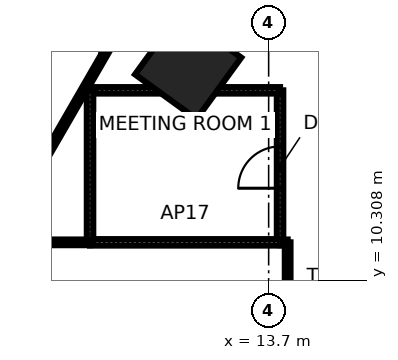
"""IFC4 building model, lengths in metres.
Left out: names, types, materials, properties, quantities, classifications, styles, units other than length and angle.
Written with IfcOpenShell. Run it as: python <this file> out.ifc"""

import sys

from ifc_helpers import new_model, si_unit, direction, frame, frame_2d, origin, origin_2d, place, context, subcontext, project, spatial, rectangle, extrude, element, fill, save


model = new_model("IFC4")
c1 = context("Model", 3, precision=1e-05, world=origin(), true_north=direction((0.0, 1.0)))
c2 = subcontext(c1, "Body", "Model", "MODEL_VIEW")
j1 = project(units=[si_unit("LENGTHUNIT", "METRE"), si_unit("PLANEANGLEUNIT", "RADIAN")], contexts=[c1])
p1 = place(None, origin())
s1 = spatial("IfcSite", under=j1, at=p1, CompositionType="ELEMENT")
p2 = place(p1, origin())
s2 = spatial("IfcBuilding", under=s1, at=p2, CompositionType="ELEMENT")
p3 = place(p2, frame((0.0, 0.0, 82.6)))
s3 = spatial("IfcBuildingStorey", under=s2, at=p3, CompositionType="ELEMENT", Elevation=82.6)
p4 = place(p3, frame((11.581, 15.94, 0.0), z_axis=(0.0, 0.0, 1.0), x_axis=(0.587785252292, 0.809016994375, 0.0)))
e1 = element("IfcColumn", 1, at=p4, inside=s3, PredefinedType="COLUMN", context=c2, shape_type="SweptSolid", body=[
    extrude(rectangle(XDim=2.0, YDim=2.0, at=origin_2d()), origin(), (0.0, 0.0, 1.0), 4.2),
])
p5 = place(p3, frame((14.2, 9.5, 0.0), z_axis=(0.0, 0.0, 1.0), x_axis=(0.0, 1.0, 0.0)))
e2 = element("IfcWall", 2, at=p5, inside=s3, PredefinedType="PARTITIONING", context=c2, shape_type="SweptSolid", body=[
    extrude(rectangle(XDim=1.8, YDim=0.15, at=frame_2d((0.9, 0.0))), origin(), (0.0, 0.0, 1.0), 4.0),
])
p6 = place(p3, frame((14.2, 11.3, 0.0), z_axis=(0.0, 0.0, 1.0), x_axis=(-1.0, 0.0, 0.0)))
e3 = element("IfcWall", 3, at=p6, inside=s3, PredefinedType="PARTITIONING", context=c2, shape_type="SweptSolid", body=[
    extrude(rectangle(XDim=0.2, YDim=0.15, at=frame_2d((0.1, 0.0))), origin(), (0.0, 0.0, 1.0), 4.0),
])
p7 = place(p3, frame((14.0, 11.3, 0.0), z_axis=(0.0, 0.0, 1.0), x_axis=(0.0, 1.0, 0.0)))
e4 = element("IfcWall", 4, at=p7, inside=s3, PredefinedType="PARTITIONING", context=c2, shape_type="SweptSolid", body=[
    extrude(rectangle(XDim=4.0, YDim=0.17, at=frame_2d((2.0, 0.0))), origin(), (0.0, 0.0, 1.0), 4.0),
])
p8 = place(p7, frame((1.424, 0.0, 0.0)))
e5 = element("IfcOpeningElement", 5, at=p8, cuts=e4, PredefinedType="OPENING", context=c2, shape_type="SweptSolid", body=[
    extrude(rectangle(XDim=1.1, YDim=2.4, at=frame_2d((0.55, 1.2))), frame((0.0, 0.095, 0.0), z_axis=(0.0, -1.0, 0.0), x_axis=(1.0, 0.0, 0.0)), (0.0, 0.0, 1.0), 0.19),
])
for number, where, z_axis, x_axis in (
    (6, (9.0, 11.3, 0.0), (0.0, 0.0, 1.0), (1.0, 0.0, 0.0)),
    (7, (14.0, 15.3, 0.0), (0.0, 0.0, 1.0), (-1.0, 0.0, 0.0)),
):
    element("IfcWall", number, at=place(p3, frame(where, z_axis=z_axis, x_axis=x_axis)), inside=s3, PredefinedType="PARTITIONING", context=c2, shape_type="SweptSolid", body=[
        extrude(rectangle(XDim=5.0, YDim=0.17, at=frame_2d((2.5, 0.0))), origin(), (0.0, 0.0, 1.0), 4.0),
    ])
p9 = place(p3, frame((9.0, 15.3, 0.0), z_axis=(0.0, 0.0, 1.0), x_axis=(0.0, -1.0, 0.0)))
e8 = element("IfcWall", 8, at=p9, inside=s3, PredefinedType="PARTITIONING", context=c2, shape_type="SweptSolid", body=[
    extrude(rectangle(XDim=4.0, YDim=0.17, at=frame_2d((2.0, 0.0))), origin(), (0.0, 0.0, 1.0), 4.0),
])
p10 = place(p3, frame((6.524, 11.3, 0.0), z_axis=(0.0, 0.0, 1.0), x_axis=(0.499989292232, 0.866031585829, 0.0)))
e9 = element("IfcWall", 9, at=p10, inside=s3, PredefinedType="PARTITIONING", context=c2, shape_type="SweptSolid", body=[
    extrude(rectangle(XDim=10.85, YDim=0.15, at=frame_2d((5.425, 0.0))), origin(), (0.0, 0.0, 1.0), 4.0),
])
p11 = place(p3, frame((9.0, 11.3, 0.0), z_axis=(0.0, 0.0, 1.0), x_axis=(-1.0, 0.0, 0.0)))
e10 = element("IfcWall", 10, at=p11, inside=s3, PredefinedType="PARTITIONING", context=c2, shape_type="SweptSolid", body=[
    extrude(rectangle(XDim=9.0, YDim=0.15, at=frame_2d((4.5, 0.0))), origin(), (0.0, 0.0, 1.0), 4.0),
])
p12 = place(p8, origin())
e11 = element("IfcDoor", 11, at=p12, inside=s3, OperationType="SINGLE_SWING_LEFT", PredefinedType="DOOR", context=c2, shape_type="SweptSolid", body=[
    extrude(rectangle(XDim=1.1, YDim=2.4, at=frame_2d((0.55, 1.2))), frame((0.0, 0.025, 0.0), z_axis=(0.0, -1.0, 0.0), x_axis=(1.0, 0.0, 0.0)), (0.0, 0.0, 1.0), 0.05),
])
fill(e5, e11)
save(model, sys.argv[1])
